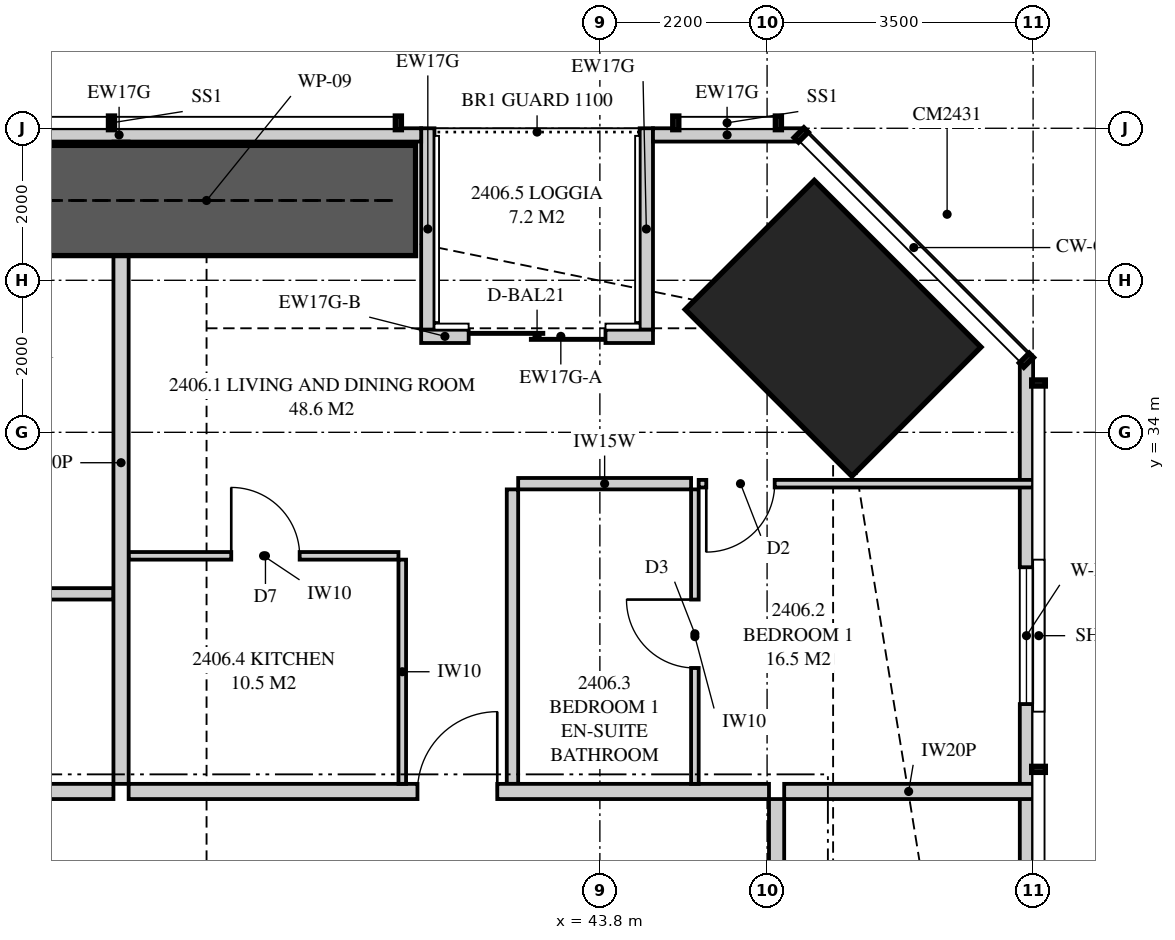
"""IFC4 building model, lengths in metres.
Left out: names, types, materials, properties, quantities, classifications, styles, units other than length and angle.
Written with IfcOpenShell. Run it as: python <this file> out.ifc"""

import sys

from ifc_helpers import new_model, si_unit, direction, frame, frame_2d, origin, origin_2d, place, context, subcontext, project, spatial, polyline, rectangle, outline, extrude, element, fill, save


model = new_model("IFC4")
c1 = context("Model", 3, precision=1e-05, world=origin(), true_north=direction((0.0, 1.0)))
c2 = subcontext(c1, "Body", "Model", "MODEL_VIEW")
j1 = project(units=[si_unit("LENGTHUNIT", "METRE"), si_unit("PLANEANGLEUNIT", "RADIAN")], contexts=[c1])
p1 = place(None, origin())
s1 = spatial("IfcSite", under=j1, at=p1, CompositionType="ELEMENT")
p2 = place(p1, origin())
s2 = spatial("IfcBuilding", under=s1, at=p2, CompositionType="ELEMENT")
p3 = place(p2, frame((0.0, 0.0, 91.45)))
s3 = spatial("IfcBuildingStorey", under=s2, at=p3, CompositionType="ELEMENT", Elevation=91.45)
p4 = place(p3, frame((46.869, 35.369, 0.0), z_axis=(0.0, 0.0, 1.0), x_axis=(-0.707106781187, -0.707106781187, 0.0)))
e1 = element("IfcColumn", 1, at=p4, inside=s3, PredefinedType="COLUMN", context=c2, shape_type="SweptSolid", body=[
    extrude(rectangle(XDim=2.4, YDim=3.1, at=origin_2d()), origin(), (0.0, 0.0, 1.0), 3.35),
])
p5 = place(p3, frame((49.413, 3.051, 0.0), z_axis=(0.0, 0.0, 1.0), x_axis=(0.0, 1.0, 0.0)))
e2 = element("IfcWall", 2, at=p5, inside=s3, PredefinedType="SOLIDWALL", context=c2, shape_type="SweptSolid", body=[
    extrude(outline(polyline([(0.0, 0.0), (31.897, 0.0), (31.897, 3.11), (22.167, 3.11), (22.167, 2.15), (22.074, 2.15), (22.074, 3.11), (21.949, 3.11), (21.949, 2.15), (9.949, 2.15), (9.949, 3.11), (9.823, 3.11), (9.823, 2.15), (9.73, 2.15), (9.73, 3.11), (0.0, 3.11), (0.0, 0.0)])), frame((0.0, 0.087, 0.0), z_axis=(0.0, -1.0, 0.0), x_axis=(1.0, 0.0, 0.0)), (0.0, 0.0, 1.0), 0.175),
])
p6 = place(p5, frame((2.224, 0.0, 0.4)))
e3 = element("IfcOpeningElement", 3, at=p6, cuts=e2, PredefinedType="OPENING", context=c2, shape_type="SweptSolid", body=[
    extrude(rectangle(XDim=1.8, YDim=1.7, at=frame_2d((0.9, 0.85))), frame((0.0, 0.097, 0.0), z_axis=(0.0, -1.0, 0.0), x_axis=(1.0, 0.0, 0.0)), (0.0, 0.0, 1.0), 0.195),
])
p7 = place(p5, frame((14.849, 0.0, 0.4)))
e4 = element("IfcOpeningElement", 4, at=p7, cuts=e2, PredefinedType="OPENING", context=c2, shape_type="SweptSolid", body=[
    extrude(rectangle(XDim=1.2, YDim=1.7, at=frame_2d((0.6, 0.85))), frame((0.0, 0.097, 0.0), z_axis=(0.0, -1.0, 0.0), x_axis=(1.0, 0.0, 0.0)), (0.0, 0.0, 1.0), 0.195),
])
p8 = place(p5, frame((27.373, 0.0, 0.4)))
e5 = element("IfcOpeningElement", 5, at=p8, cuts=e2, PredefinedType="OPENING", context=c2, shape_type="SweptSolid", body=[
    extrude(rectangle(XDim=1.8, YDim=1.7, at=frame_2d((0.9, 0.85))), frame((0.0, 0.097, 0.0), z_axis=(0.0, -1.0, 0.0), x_axis=(1.0, 0.0, 0.0)), (0.0, 0.0, 1.0), 0.195),
])
p9 = place(p3, frame((46.449, 37.913, 0.0), z_axis=(0.0, 0.0, 1.0), x_axis=(-1.0, 0.0, 0.0)))
e6 = element("IfcWall", 6, at=p9, inside=s3, PredefinedType="SOLIDWALL", context=c2, shape_type="SweptSolid", body=[
    extrude(rectangle(XDim=1.95, YDim=0.175, at=frame_2d((0.975, 0.0))), origin(), (0.0, 0.0, 1.0), 3.11),
])
p10 = place(p3, frame((41.449, 37.913, 0.0), z_axis=(0.0, 0.0, 1.0), x_axis=(-1.0, 0.0, 0.0)))
e7 = element("IfcWall", 7, at=p10, inside=s3, PredefinedType="SOLIDWALL", context=c2, shape_type="SweptSolid", body=[
    extrude(outline(polyline([(0.0, 0.0), (7.949, 0.0), (7.949, 2.15), (2.824, 2.15), (2.824, 3.11), (2.666, 3.11), (2.666, 2.15), (2.62, 2.15), (2.62, 3.11), (0.0, 3.11), (0.0, 0.0)])), frame((0.0, 0.087, 0.0), z_axis=(0.0, -1.0, 0.0), x_axis=(1.0, 0.0, 0.0)), (0.0, 0.0, 1.0), 0.175),
])
p11 = place(p10, frame((5.674, 0.0, 0.4)))
e8 = element("IfcOpeningElement", 8, at=p11, cuts=e7, PredefinedType="OPENING", context=c2, shape_type="SweptSolid", body=[
    extrude(rectangle(XDim=1.8, YDim=1.7, at=frame_2d((0.9, 0.85))), frame((0.0, 0.097, 0.0), z_axis=(0.0, -1.0, 0.0), x_axis=(1.0, 0.0, 0.0)), (0.0, 0.0, 1.0), 0.195),
])
p12 = place(p3, frame((44.499, 35.262, 0.0), z_axis=(0.0, 0.0, 1.0), x_axis=(-1.0, 0.0, 0.0)))
e9 = element("IfcWall", 9, at=p12, inside=s3, PredefinedType="SOLIDWALL", context=c2, shape_type="SweptSolid", body=[
    extrude(rectangle(XDim=2.425, YDim=0.175, at=frame_2d((1.212, 0.0))), origin(), (0.0, 0.0, 1.0), 2.15),
])
p13 = place(p12, frame((0.625, 0.0, 0.0)))
e10 = element("IfcOpeningElement", 10, at=p13, cuts=e9, PredefinedType="OPENING", context=c2, shape_type="SweptSolid", body=[
    extrude(rectangle(XDim=1.8, YDim=2.1, at=frame_2d((0.9, 1.05))), frame((0.0, 0.097, 0.0), z_axis=(0.0, -1.0, 0.0), x_axis=(1.0, 0.0, 0.0)), (0.0, 0.0, 1.0), 0.195),
])
p14 = place(p3, frame((42.074, 35.262, 0.0), z_axis=(0.0, 0.0, 1.0), x_axis=(-1.0, 0.0, 0.0)))
e11 = element("IfcWall", 11, at=p14, inside=s3, PredefinedType="SOLIDWALL", context=c2, shape_type="SweptSolid", body=[
    extrude(rectangle(XDim=0.625, YDim=0.175, at=frame_2d((0.312, 0.0))), origin(), (0.0, 0.0, 1.0), 2.51),
])
p15 = place(p3, frame((44.411, 38.0, 0.0), z_axis=(0.0, 0.0, 1.0), x_axis=(0.0, -1.0, 0.0)))
e12 = element("IfcWall", 12, at=p15, inside=s3, PredefinedType="SOLIDWALL", context=c2, shape_type="SweptSolid", body=[
    extrude(outline(polyline([(0.0, 0.0), (2.65, 0.0), (2.65, 2.15), (1.296, 2.15), (1.296, 3.11), (0.0, 3.11), (0.0, 0.0)])), frame((0.0, 0.087, 0.0), z_axis=(0.0, -1.0, 0.0), x_axis=(1.0, 0.0, 0.0)), (0.0, 0.0, 1.0), 0.175),
])
p16 = place(p3, frame((41.536, 38.0, 0.0), z_axis=(0.0, 0.0, 1.0), x_axis=(0.0, -1.0, 0.0)))
e13 = element("IfcWall", 13, at=p16, inside=s3, PredefinedType="SOLIDWALL", context=c2, shape_type="SweptSolid", body=[
    extrude(outline(polyline([(0.0, 0.0), (2.65, 0.0), (2.65, 2.51), (2.378, 2.51), (2.378, 2.15), (0.709, 2.15), (0.709, 3.11), (0.0, 3.11), (0.0, 0.0)])), frame((0.0, 0.087, 0.0), z_axis=(0.0, -1.0, 0.0), x_axis=(1.0, 0.0, 0.0)), (0.0, 0.0, 1.0), 0.175),
])
p17 = place(p3, frame((37.5, 37.825, 0.0), z_axis=(0.0, 0.0, 1.0), x_axis=(0.0, -1.0, 0.0)))
e14 = element("IfcWall", 14, at=p17, inside=s3, PredefinedType="PARTITIONING", context=c2, shape_type="SweptSolid", body=[
    extrude(outline(polyline([(0.529, 2.15), (0.0, 2.15), (0.0, 0.0), (0.529, 0.0), (0.529, 0.735), (1.021, 0.735), (1.021, 0.0), (8.45, 0.0), (8.45, 3.11), (1.685, 3.11), (1.685, 2.15), (1.021, 2.15), (1.021, 1.415), (0.529, 1.415), (0.529, 2.15)])), frame((0.0, 0.1, 0.0), z_axis=(0.0, -1.0, 0.0), x_axis=(1.0, 0.0, 0.0)), (0.0, 0.0, 1.0), 0.2),
])
p18 = place(p3, frame((33.6, 31.875, 0.0), z_axis=(0.0, 0.0, 1.0), x_axis=(1.0, 0.0, 0.0)))
e15 = element("IfcWall", 15, at=p18, inside=s3, PredefinedType="PLUMBINGWALL", context=c2, shape_type="SweptSolid", body=[
    extrude(rectangle(XDim=3.8, YDim=0.15, at=frame_2d((1.9, 0.0))), origin(), (0.0, 0.0, 1.0), 3.11),
])
p19 = place(p18, frame((0.4, 0.0, 0.0)))
e16 = element("IfcOpeningElement", 16, at=p19, cuts=e15, PredefinedType="OPENING", context=c2, shape_type="SweptSolid", body=[
    extrude(rectangle(XDim=0.9, YDim=2.1, at=frame_2d((0.45, 1.05))), frame((0.0, 0.085, 0.0), z_axis=(0.0, -1.0, 0.0), x_axis=(1.0, 0.0, 0.0)), (0.0, 0.0, 1.0), 0.17),
])
p20 = place(p3, frame((37.6, 29.275, 0.0), z_axis=(0.0, 0.0, 1.0), x_axis=(1.0, 0.0, 0.0)))
e17 = element("IfcWall", 17, at=p20, inside=s3, PredefinedType="PARTITIONING", context=c2, shape_type="SweptSolid", body=[
    extrude(outline(polyline([(0.0, 0.0), (8.425, 0.0), (8.425, 3.11), (1.362, 3.11), (1.362, 2.541), (0.688, 2.541), (0.688, 3.11), (0.0, 3.11), (0.0, 0.0)])), frame((0.0, 0.1, 0.0), z_axis=(0.0, -1.0, 0.0), x_axis=(1.0, 0.0, 0.0)), (0.0, 0.0, 1.0), 0.2),
])
p21 = place(p20, frame((3.8, 0.0, 0.0)))
e18 = element("IfcOpeningElement", 18, at=p21, cuts=e17, PredefinedType="OPENING", context=c2, shape_type="SweptSolid", body=[
    extrude(rectangle(XDim=1.05, YDim=2.2, at=frame_2d((0.525, 1.1))), frame((0.0, 0.11, 0.0), z_axis=(0.0, -1.0, 0.0), x_axis=(1.0, 0.0, 0.0)), (0.0, 0.0, 1.0), 0.22),
])
p22 = place(p3, frame((45.05, 33.249, 0.0), z_axis=(0.0, 0.0, 1.0), x_axis=(0.0, -1.0, 0.0)))
e19 = element("IfcWall", 19, at=p22, inside=s3, PredefinedType="PARTITIONING", context=c2, shape_type="SweptSolid", body=[
    extrude(rectangle(XDim=3.874, YDim=0.1, at=frame_2d((1.937, 0.0))), origin(), (0.0, 0.0, 1.0), 3.11),
])
p23 = place(p22, frame((1.45, 0.0, 0.0)))
e20 = element("IfcOpeningElement", 20, at=p23, cuts=e19, PredefinedType="OPENING", context=c2, shape_type="SweptSolid", body=[
    extrude(rectangle(XDim=0.9, YDim=2.1, at=frame_2d((0.45, 1.05))), frame((0.0, 0.06, 0.0), z_axis=(0.0, -1.0, 0.0), x_axis=(1.0, 0.0, 0.0)), (0.0, 0.0, 1.0), 0.12),
])
p24 = place(p3, frame((45.1, 33.324, 0.0), z_axis=(0.0, 0.0, 1.0), x_axis=(1.0, 0.0, 0.0)))
e21 = element("IfcWall", 21, at=p24, inside=s3, PredefinedType="PARTITIONING", context=c2, shape_type="SweptSolid", body=[
    extrude(outline(polyline([(0.0, 0.0), (4.4, 0.0), (4.4, 3.11), (2.971, 3.11), (2.971, 2.15), (1.229, 2.15), (1.229, 3.11), (0.0, 3.11), (0.0, 0.0)])), frame((0.0, 0.05, 0.0), z_axis=(0.0, -1.0, 0.0), x_axis=(1.0, 0.0, 0.0)), (0.0, 0.0, 1.0), 0.1),
])
p25 = place(p24, frame((0.1, 0.0, 0.0)))
e22 = element("IfcOpeningElement", 22, at=p25, cuts=e21, PredefinedType="OPENING", context=c2, shape_type="SweptSolid", body=[
    extrude(rectangle(XDim=0.9, YDim=2.1, at=frame_2d((0.45, 1.05))), frame((0.0, 0.06, 0.0), z_axis=(0.0, -1.0, 0.0), x_axis=(1.0, 0.0, 0.0)), (0.0, 0.0, 1.0), 0.12),
])
p26 = place(p3, frame((42.725, 33.324, 0.0), z_axis=(0.0, 0.0, 1.0), x_axis=(1.0, 0.0, 0.0)))
e23 = element("IfcWall", 23, at=p26, inside=s3, PredefinedType="PLUMBINGWALL", context=c2, shape_type="SweptSolid", body=[
    extrude(rectangle(XDim=2.275, YDim=0.15, at=frame_2d((1.137, 0.0))), origin(), (0.0, 0.0, 1.0), 3.11),
])
p27 = place(p3, frame((42.65, 33.249, 0.0), z_axis=(0.0, 0.0, 1.0), x_axis=(0.0, -1.0, 0.0)))
e24 = element("IfcWall", 24, at=p27, inside=s3, PredefinedType="PLUMBINGWALL", context=c2, shape_type="SweptSolid", body=[
    extrude(rectangle(XDim=3.874, YDim=0.15, at=frame_2d((1.937, 0.0))), origin(), (0.0, 0.0, 1.0), 3.11),
])
p28 = place(p3, frame((37.6, 32.375, 0.0), z_axis=(0.0, 0.0, 1.0), x_axis=(1.0, 0.0, 0.0)))
e25 = element("IfcWall", 25, at=p28, inside=s3, PredefinedType="PARTITIONING", context=c2, shape_type="SweptSolid", body=[
    extrude(outline(polyline([(0.0, 0.0), (3.55, 0.0), (3.55, 3.11), (1.312, 3.11), (1.312, 2.541), (0.738, 2.541), (0.738, 3.11), (0.0, 3.11), (0.0, 0.0)])), frame((0.0, 0.05, 0.0), z_axis=(0.0, -1.0, 0.0), x_axis=(1.0, 0.0, 0.0)), (0.0, 0.0, 1.0), 0.1),
])
p29 = place(p28, frame((1.35, 0.0, 0.0)))
e26 = element("IfcOpeningElement", 26, at=p29, cuts=e25, PredefinedType="OPENING", context=c2, shape_type="SweptSolid", body=[
    extrude(rectangle(XDim=0.9, YDim=2.1, at=frame_2d((0.45, 1.05))), frame((0.0, 0.06, 0.0), z_axis=(0.0, -1.0, 0.0), x_axis=(1.0, 0.0, 0.0)), (0.0, 0.0, 1.0), 0.12),
])
p30 = place(p3, frame((41.2, 32.325, 0.0), z_axis=(0.0, 0.0, 1.0), x_axis=(0.0, -1.0, 0.0)))
e27 = element("IfcWall", 27, at=p30, inside=s3, PredefinedType="PARTITIONING", context=c2, shape_type="SweptSolid", body=[
    extrude(rectangle(XDim=2.95, YDim=0.1, at=frame_2d((1.475, 0.0))), origin(), (0.0, 0.0, 1.0), 3.11),
])
p31 = place(p3, frame((46.225, 29.275, 0.0), z_axis=(0.0, 0.0, 1.0), x_axis=(1.0, 0.0, 0.0)))
e28 = element("IfcWall", 28, at=p31, inside=s3, PredefinedType="PARTITIONING", context=c2, shape_type="SweptSolid", body=[
    extrude(outline(polyline([(0.0, 0.0), (3.275, 0.0), (3.275, 3.11), (2.554, 3.11), (2.554, 2.15), (0.805, 2.15), (0.805, 2.541), (0.306, 2.541), (0.306, 3.11), (0.0, 3.11), (0.0, 0.0)])), frame((0.0, 0.1, 0.0), z_axis=(0.0, -1.0, 0.0), x_axis=(1.0, 0.0, 0.0)), (0.0, 0.0, 1.0), 0.2),
])
p32 = place(p3, frame((33.275, 29.275, 0.0), z_axis=(0.0, 0.0, 1.0), x_axis=(1.0, 0.0, 0.0)))
e29 = element("IfcWall", 29, at=p32, inside=s3, PredefinedType="PARTITIONING", context=c2, shape_type="SweptSolid", body=[
    extrude(rectangle(XDim=4.125, YDim=0.2, at=frame_2d((2.062, 0.0))), origin(), (0.0, 0.0, 1.0), 3.11),
])
p33 = place(p3, frame((46.125, 20.7, 0.0), z_axis=(0.0, 0.0, 1.0), x_axis=(0.0, 1.0, 0.0)))
e30 = element("IfcWall", 30, at=p33, inside=s3, PredefinedType="PARTITIONING", context=c2, shape_type="SweptSolid", body=[
    extrude(outline(polyline([(0.0, 0.0), (8.475, 0.0), (8.475, 3.11), (4.637, 3.11), (4.637, 2.541), (3.963, 2.541), (3.963, 3.11), (0.0, 3.11), (0.0, 0.0)])), frame((0.0, 0.1, 0.0), z_axis=(0.0, -1.0, 0.0), x_axis=(1.0, 0.0, 0.0)), (0.0, 0.0, 1.0), 0.2),
])
p34 = place(p33, frame((6.625, 0.0, 0.0)))
e31 = element("IfcOpeningElement", 31, at=p34, cuts=e30, PredefinedType="OPENING", context=c2, shape_type="SweptSolid", body=[
    extrude(rectangle(XDim=1.0, YDim=2.1, at=frame_2d((0.5, 1.05))), frame((0.0, 0.11, 0.0), z_axis=(0.0, -1.0, 0.0), x_axis=(1.0, 0.0, 0.0)), (0.0, 0.0, 1.0), 0.22),
])
p35 = place(p3, frame((35.875, 37.05, 0.0), z_axis=(0.0, 0.0, 1.0), x_axis=(1.0, 0.0, 0.0)))
e32 = element("IfcWall", 32, at=p35, inside=s3, PredefinedType="SHEAR", context=c2, shape_type="SweptSolid", body=[
    extrude(rectangle(XDim=5.5, YDim=1.45, at=frame_2d((2.75, 0.0))), origin(), (0.0, 0.0, 1.0), 3.35),
])
p36 = place(p8, origin())
e33 = element("IfcWindow", 33, at=p36, inside=s3, PartitioningType="SINGLE_PANEL", PredefinedType="WINDOW", context=c2, shape_type="SweptSolid", body=[
    extrude(rectangle(XDim=1.8, YDim=1.7, at=frame_2d((0.9, 0.85))), frame((0.0, 0.03, 0.0), z_axis=(0.0, -1.0, 0.0), x_axis=(1.0, 0.0, 0.0)), (0.0, 0.0, 1.0), 0.06),
])
fill(e5, e33)
p37 = place(p13, origin())
e34 = element("IfcDoor", 34, at=p37, inside=s3, OperationType="SLIDING_TO_LEFT", PredefinedType="DOOR", context=c2, shape_type="SweptSolid", body=[
    extrude(rectangle(XDim=1.8, YDim=2.1, at=frame_2d((0.9, 1.05))), frame((0.0, 0.025, 0.0), z_axis=(0.0, -1.0, 0.0), x_axis=(1.0, 0.0, 0.0)), (0.0, 0.0, 1.0), 0.05),
])
fill(e10, e34)
p38 = place(p21, origin())
e35 = element("IfcDoor", 35, at=p38, inside=s3, OperationType="SINGLE_SWING_RIGHT", PredefinedType="DOOR", context=c2, shape_type="SweptSolid", body=[
    extrude(rectangle(XDim=1.05, YDim=2.2, at=frame_2d((0.525, 1.1))), frame((0.0, 0.025, 0.0), z_axis=(0.0, -1.0, 0.0), x_axis=(1.0, 0.0, 0.0)), (0.0, 0.0, 1.0), 0.05),
])
fill(e18, e35)
p39 = place(p25, frame((0.9, 0.0, 0.0), z_axis=(0.0, 0.0, 1.0), x_axis=(-1.0, 0.0, 0.0)))
e36 = element("IfcDoor", 36, at=p39, inside=s3, OperationType="SINGLE_SWING_RIGHT", PredefinedType="DOOR", context=c2, shape_type="SweptSolid", body=[
    extrude(rectangle(XDim=0.9, YDim=2.1, at=frame_2d((0.45, 1.05))), frame((0.0, 0.025, 0.0), z_axis=(0.0, -1.0, 0.0), x_axis=(1.0, 0.0, 0.0)), (0.0, 0.0, 1.0), 0.05),
])
fill(e22, e36)
p40 = place(p23, frame((0.9, 0.0, 0.0), z_axis=(0.0, 0.0, 1.0), x_axis=(-1.0, 0.0, 0.0)))
e37 = element("IfcDoor", 37, at=p40, inside=s3, OperationType="SINGLE_SWING_RIGHT", PredefinedType="DOOR", context=c2, shape_type="SweptSolid", body=[
    extrude(rectangle(XDim=0.9, YDim=2.1, at=frame_2d((0.45, 1.05))), frame((0.0, 0.025, 0.0), z_axis=(0.0, -1.0, 0.0), x_axis=(1.0, 0.0, 0.0)), (0.0, 0.0, 1.0), 0.05),
])
fill(e20, e37)
p41 = place(p29, origin())
e38 = element("IfcDoor", 38, at=p41, inside=s3, OperationType="SINGLE_SWING_LEFT", PredefinedType="DOOR", context=c2, shape_type="SweptSolid", body=[
    extrude(rectangle(XDim=0.9, YDim=2.1, at=frame_2d((0.45, 1.05))), frame((0.0, 0.025, 0.0), z_axis=(0.0, -1.0, 0.0), x_axis=(1.0, 0.0, 0.0)), (0.0, 0.0, 1.0), 0.05),
])
fill(e26, e38)
save(model, sys.argv[1])
